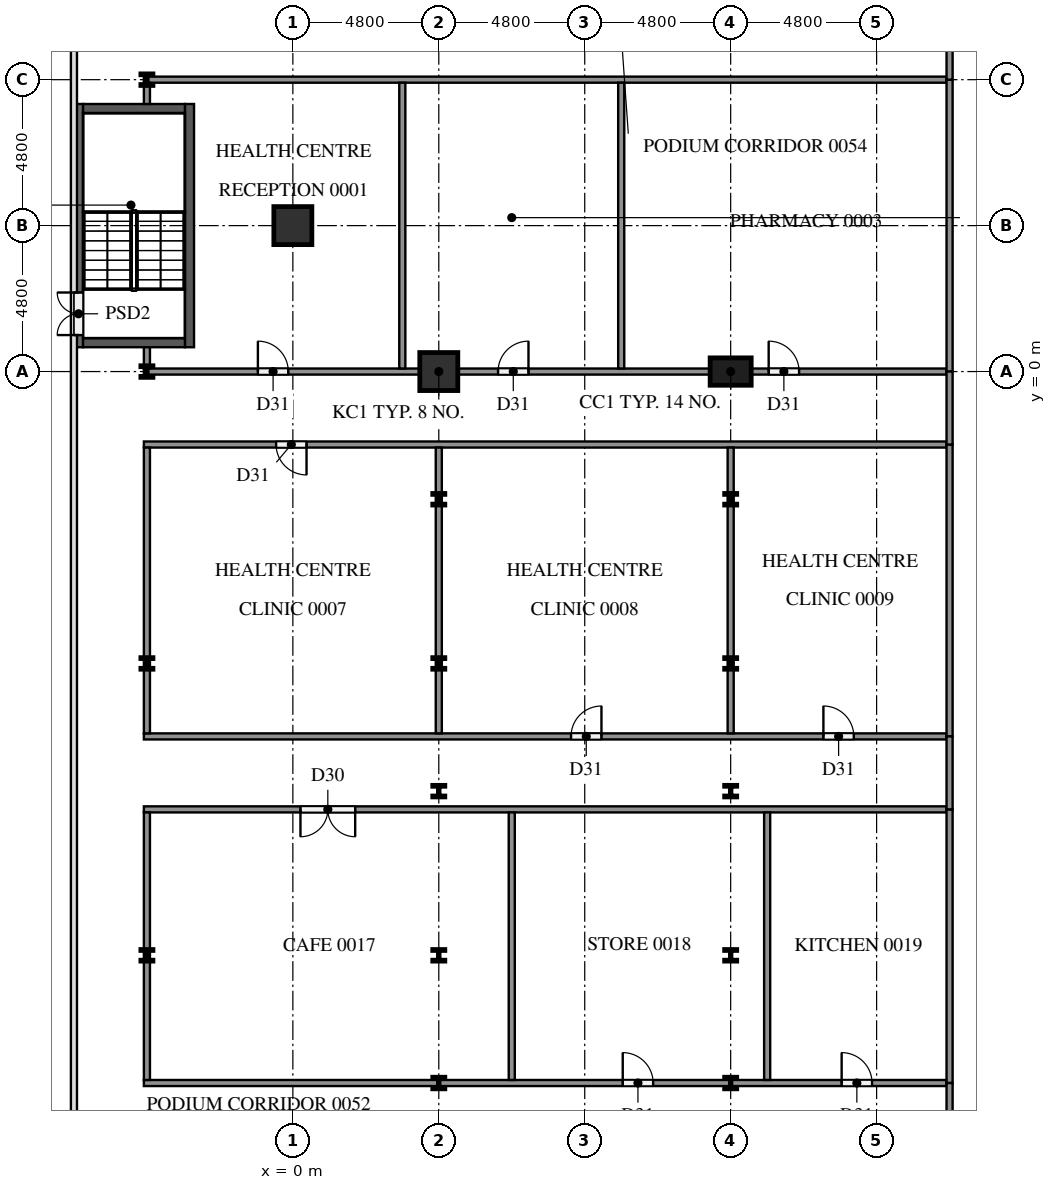
"""IFC4 building model, lengths in metres.
Left out: names, types, materials, properties, quantities, classifications, styles, units other than length and angle.
Written with IfcOpenShell. Run it as: python <this file> out.ifc"""

import sys

from ifc_helpers import new_model, si_unit, direction, frame, frame_2d, origin, origin_2d, place, context, subcontext, project, spatial, rectangle, i_section, extrude, element, fill, save


model = new_model("IFC4")
c1 = context("Model", 3, precision=1e-05, world=origin(), true_north=direction((0.0, 1.0)))
c2 = subcontext(c1, "Body", "Model", "MODEL_VIEW")
j1 = project(units=[si_unit("LENGTHUNIT", "METRE"), si_unit("PLANEANGLEUNIT", "RADIAN")], contexts=[c1])
p1 = place(None, origin())
s1 = spatial("IfcSite", under=j1, at=p1, CompositionType="ELEMENT")
p2 = place(p1, origin())
s2 = spatial("IfcBuilding", under=s1, at=p2, CompositionType="ELEMENT")
p3 = place(p2, origin())
s3 = spatial("IfcBuildingStorey", under=s2, at=p3, CompositionType="ELEMENT", Elevation=0.0)
p4 = place(p3, frame((-7.05, 0.8, 0.0), z_axis=(0.0, 0.0, 1.0), x_axis=(0.0, 1.0, 0.0)))
e1 = element("IfcWall", 1, at=p4, inside=s3, PredefinedType="SOLIDWALL", context=c2, shape_type="SweptSolid", body=[
    extrude(rectangle(XDim=8.0, YDim=0.3, at=frame_2d((4.0, 0.0))), origin(), (0.0, 0.0, 1.0), 5.7),
])
p5 = place(p4, frame((0.4, 0.0, 0.0)))
e2 = element("IfcOpeningElement", 2, at=p5, cuts=e1, PredefinedType="OPENING", context=c2, shape_type="SweptSolid", body=[
    extrude(rectangle(XDim=1.4, YDim=2.1, at=frame_2d((0.7, 1.05))), frame((0.0, 0.16, 0.0), z_axis=(0.0, -1.0, 0.0), x_axis=(1.0, 0.0, 0.0)), (0.0, 0.0, 1.0), 0.32),
])
p6 = place(p3, frame((-3.4, 0.8, 0.0), z_axis=(0.0, 0.0, 1.0), x_axis=(0.0, 1.0, 0.0)))
e3 = element("IfcWall", 3, at=p6, inside=s3, PredefinedType="SOLIDWALL", context=c2, shape_type="SweptSolid", body=[
    extrude(rectangle(XDim=8.0, YDim=0.3, at=frame_2d((4.0, 0.0))), origin(), (0.0, 0.0, 1.0), 5.7),
])
for number, where, z_axis, x_axis in (
    (4, (-6.9, 0.95, 0.0), (0.0, 0.0, 1.0), (1.0, 0.0, 0.0)),
    (5, (-6.9, 8.65, 0.0), (0.0, 0.0, 1.0), (1.0, 0.0, 0.0)),
):
    element("IfcWall", number, at=place(p3, frame(where, z_axis=z_axis, x_axis=x_axis)), inside=s3, PredefinedType="SOLIDWALL", context=c2, shape_type="SweptSolid", body=[
        extrude(rectangle(XDim=3.35, YDim=0.3, at=frame_2d((1.675, 0.0))), origin(), (0.0, 0.0, 1.0), 5.7),
    ])
p7 = place(p3, frame((4.8, 0.0, 0.0), z_axis=(0.0, 0.0, 1.0), x_axis=(1.0, 0.0, 0.0)))
e6 = element("IfcColumn", 6, at=p7, inside=s3, PredefinedType="COLUMN", context=c2, shape_type="SweptSolid", body=[
    extrude(rectangle(XDim=1.25, YDim=1.25, at=origin_2d()), origin(), (0.0, 0.0, 1.0), 5.7),
])
p8 = place(p3, frame((14.4, 0.0, 0.0), z_axis=(0.0, 0.0, 1.0), x_axis=(1.0, 0.0, 0.0)))
e7 = element("IfcColumn", 7, at=p8, inside=s3, PredefinedType="COLUMN", context=c2, shape_type="SweptSolid", body=[
    extrude(rectangle(XDim=1.35, YDim=0.9, at=origin_2d()), origin(), (0.0, 0.0, 1.0), 5.7),
])
p9 = place(p3, frame((0.0, 4.8, 0.0), z_axis=(0.0, 0.0, 1.0), x_axis=(1.0, 0.0, 0.0)))
e8 = element("IfcColumn", 8, at=p9, inside=s3, PredefinedType="COLUMN", context=c2, shape_type="SweptSolid", body=[
    extrude(rectangle(XDim=1.25, YDim=1.25, at=origin_2d()), origin(), (0.0, 0.0, 1.0), 5.7),
])
for number, where, z_axis, x_axis in (
    (9, (-4.8, -19.2, 0.0), (0.0, 0.0, 1.0), (1.0, 0.0, 0.0)),
    (10, (-4.8, -9.6, 0.0), (0.0, 0.0, 1.0), (1.0, 0.0, 0.0)),
    (11, (-4.8, 0.0, 0.0), (0.0, 0.0, 1.0), (1.0, 0.0, 0.0)),
    (12, (-4.8, 9.6, 0.0), (0.0, 0.0, 1.0), (1.0, 0.0, 0.0)),
    (13, (4.8, -23.4, 0.0), (0.0, 0.0, 1.0), (1.0, 0.0, 0.0)),
    (14, (4.8, -19.2, 0.0), (0.0, 0.0, 1.0), (1.0, 0.0, 0.0)),
    (15, (4.8, -13.8, 0.0), (0.0, 0.0, 1.0), (1.0, 0.0, 0.0)),
    (16, (4.8, -9.6, 0.0), (0.0, 0.0, 1.0), (1.0, 0.0, 0.0)),
    (17, (4.8, -4.2, 0.0), (0.0, 0.0, 1.0), (1.0, 0.0, 0.0)),
    (18, (14.4, -23.4, 0.0), (0.0, 0.0, 1.0), (1.0, 0.0, 0.0)),
    (19, (14.4, -19.2, 0.0), (0.0, 0.0, 1.0), (1.0, 0.0, 0.0)),
    (20, (14.4, -13.8, 0.0), (0.0, 0.0, 1.0), (1.0, 0.0, 0.0)),
    (21, (14.4, -9.6, 0.0), (0.0, 0.0, 1.0), (1.0, 0.0, 0.0)),
    (22, (14.4, -4.2, 0.0), (0.0, 0.0, 1.0), (1.0, 0.0, 0.0)),
):
    element("IfcColumn", number, at=place(p3, frame(where, z_axis=z_axis, x_axis=x_axis)), inside=s3, PredefinedType="COLUMN", context=c2, shape_type="SweptSolid", body=[
        extrude(i_section(OverallWidth=0.396, OverallDepth=0.381, WebThickness=0.019, FlangeThickness=0.03, at=origin_2d()), origin(), (0.0, 0.0, 1.0), 5.7),
    ])
p10 = place(p3, frame((-4.9, -23.4, 0.0), z_axis=(0.0, 0.0, 1.0), x_axis=(1.0, 0.0, 0.0)))
e23 = element("IfcWall", 23, at=p10, inside=s3, PredefinedType="PARTITIONING", context=c2, shape_type="SweptSolid", body=[
    extrude(rectangle(XDim=26.4, YDim=0.2, at=frame_2d((13.2, 0.0))), origin(), (0.0, 0.0, 1.0), 5.7),
])
p11 = place(p10, frame((15.75, 0.0, 0.0)))
e24 = element("IfcOpeningElement", 24, at=p11, cuts=e23, PredefinedType="OPENING", context=c2, shape_type="SweptSolid", body=[
    extrude(rectangle(XDim=1.0, YDim=2.1, at=frame_2d((0.5, 1.05))), frame((0.0, 0.11, 0.0), z_axis=(0.0, -1.0, 0.0), x_axis=(1.0, 0.0, 0.0)), (0.0, 0.0, 1.0), 0.22),
])
p12 = place(p10, frame((22.95, 0.0, 0.0)))
e25 = element("IfcOpeningElement", 25, at=p12, cuts=e23, PredefinedType="OPENING", context=c2, shape_type="SweptSolid", body=[
    extrude(rectangle(XDim=1.0, YDim=2.1, at=frame_2d((0.5, 1.05))), frame((0.0, 0.11, 0.0), z_axis=(0.0, -1.0, 0.0), x_axis=(1.0, 0.0, 0.0)), (0.0, 0.0, 1.0), 0.22),
])
p13 = place(p3, frame((21.5, -14.4, 0.0), z_axis=(0.0, 0.0, 1.0), x_axis=(-1.0, 0.0, 0.0)))
e26 = element("IfcWall", 26, at=p13, inside=s3, PredefinedType="PARTITIONING", context=c2, shape_type="SweptSolid", body=[
    extrude(rectangle(XDim=26.4, YDim=0.2, at=frame_2d((13.2, 0.0))), origin(), (0.0, 0.0, 1.0), 5.7),
])
p14 = place(p13, frame((19.45, 0.0, 0.0)))
e27 = element("IfcOpeningElement", 27, at=p14, cuts=e26, PredefinedType="OPENING", context=c2, shape_type="SweptSolid", body=[
    extrude(rectangle(XDim=1.8, YDim=2.1, at=frame_2d((0.9, 1.05))), frame((0.0, 0.11, 0.0), z_axis=(0.0, -1.0, 0.0), x_axis=(1.0, 0.0, 0.0)), (0.0, 0.0, 1.0), 0.22),
])
p15 = place(p3, frame((-4.9, -12.0, 0.0), z_axis=(0.0, 0.0, 1.0), x_axis=(1.0, 0.0, 0.0)))
e28 = element("IfcWall", 28, at=p15, inside=s3, PredefinedType="PARTITIONING", context=c2, shape_type="SweptSolid", body=[
    extrude(rectangle(XDim=26.4, YDim=0.2, at=frame_2d((13.2, 0.0))), origin(), (0.0, 0.0, 1.0), 5.7),
])
p16 = place(p15, frame((14.05, 0.0, 0.0)))
e29 = element("IfcOpeningElement", 29, at=p16, cuts=e28, PredefinedType="OPENING", context=c2, shape_type="SweptSolid", body=[
    extrude(rectangle(XDim=1.0, YDim=2.1, at=frame_2d((0.5, 1.05))), frame((0.0, 0.11, 0.0), z_axis=(0.0, -1.0, 0.0), x_axis=(1.0, 0.0, 0.0)), (0.0, 0.0, 1.0), 0.22),
])
p17 = place(p15, frame((22.35, 0.0, 0.0)))
e30 = element("IfcOpeningElement", 30, at=p17, cuts=e28, PredefinedType="OPENING", context=c2, shape_type="SweptSolid", body=[
    extrude(rectangle(XDim=1.0, YDim=2.1, at=frame_2d((0.5, 1.05))), frame((0.0, 0.11, 0.0), z_axis=(0.0, -1.0, 0.0), x_axis=(1.0, 0.0, 0.0)), (0.0, 0.0, 1.0), 0.22),
])
p18 = place(p3, frame((21.5, -2.4, 0.0), z_axis=(0.0, 0.0, 1.0), x_axis=(-1.0, 0.0, 0.0)))
e31 = element("IfcWall", 31, at=p18, inside=s3, PredefinedType="PARTITIONING", context=c2, shape_type="SweptSolid", body=[
    extrude(rectangle(XDim=26.4, YDim=0.2, at=frame_2d((13.2, 0.0))), origin(), (0.0, 0.0, 1.0), 5.7),
])
p19 = place(p18, frame((21.05, 0.0, 0.0)))
e32 = element("IfcOpeningElement", 32, at=p19, cuts=e31, PredefinedType="OPENING", context=c2, shape_type="SweptSolid", body=[
    extrude(rectangle(XDim=1.0, YDim=2.1, at=frame_2d((0.5, 1.05))), frame((0.0, 0.11, 0.0), z_axis=(0.0, -1.0, 0.0), x_axis=(1.0, 0.0, 0.0)), (0.0, 0.0, 1.0), 0.22),
])
p20 = place(p3, frame((-4.9, 0.0, 0.0), z_axis=(0.0, 0.0, 1.0), x_axis=(1.0, 0.0, 0.0)))
e33 = element("IfcWall", 33, at=p20, inside=s3, PredefinedType="PARTITIONING", context=c2, shape_type="SweptSolid", body=[
    extrude(rectangle(XDim=26.4, YDim=0.2, at=frame_2d((13.2, 0.0))), origin(), (0.0, 0.0, 1.0), 5.7),
])
p21 = place(p20, frame((3.75, 0.0, 0.0)))
e34 = element("IfcOpeningElement", 34, at=p21, cuts=e33, PredefinedType="OPENING", context=c2, shape_type="SweptSolid", body=[
    extrude(rectangle(XDim=1.0, YDim=2.1, at=frame_2d((0.5, 1.05))), frame((0.0, 0.11, 0.0), z_axis=(0.0, -1.0, 0.0), x_axis=(1.0, 0.0, 0.0)), (0.0, 0.0, 1.0), 0.22),
])
p22 = place(p20, frame((11.65, 0.0, 0.0)))
e35 = element("IfcOpeningElement", 35, at=p22, cuts=e33, PredefinedType="OPENING", context=c2, shape_type="SweptSolid", body=[
    extrude(rectangle(XDim=1.0, YDim=2.1, at=frame_2d((0.5, 1.05))), frame((0.0, 0.11, 0.0), z_axis=(0.0, -1.0, 0.0), x_axis=(1.0, 0.0, 0.0)), (0.0, 0.0, 1.0), 0.22),
])
p23 = place(p20, frame((20.55, 0.0, 0.0)))
e36 = element("IfcOpeningElement", 36, at=p23, cuts=e33, PredefinedType="OPENING", context=c2, shape_type="SweptSolid", body=[
    extrude(rectangle(XDim=1.0, YDim=2.1, at=frame_2d((0.5, 1.05))), frame((0.0, 0.11, 0.0), z_axis=(0.0, -1.0, 0.0), x_axis=(1.0, 0.0, 0.0)), (0.0, 0.0, 1.0), 0.22),
])
p24 = place(p3, frame((-4.9, 9.6, 0.0), z_axis=(0.0, 0.0, 1.0), x_axis=(1.0, 0.0, 0.0)))
e37 = element("IfcWall", 37, at=p24, inside=s3, PredefinedType="PARTITIONING", context=c2, shape_type="SweptSolid", body=[
    extrude(rectangle(XDim=26.4, YDim=0.2, at=frame_2d((13.2, 0.0))), origin(), (0.0, 0.0, 1.0), 5.7),
])
p25 = place(p3, frame((-4.8, -23.3, 0.0), z_axis=(0.0, 0.0, 1.0), x_axis=(0.0, 1.0, 0.0)))
e38 = element("IfcWall", 38, at=p25, inside=s3, PredefinedType="PARTITIONING", context=c2, shape_type="SweptSolid", body=[
    extrude(rectangle(XDim=8.8, YDim=0.2, at=frame_2d((4.4, 0.0))), origin(), (0.0, 0.0, 1.0), 5.7),
])
p26 = place(p3, frame((-4.8, -11.9, 0.0), z_axis=(0.0, 0.0, 1.0), x_axis=(0.0, 1.0, 0.0)))
e39 = element("IfcWall", 39, at=p26, inside=s3, PredefinedType="PARTITIONING", context=c2, shape_type="SweptSolid", body=[
    extrude(rectangle(XDim=9.4, YDim=0.2, at=frame_2d((4.7, 0.0))), origin(), (0.0, 0.0, 1.0), 5.7),
])
for number, where, z_axis, x_axis in (
    (40, (-4.8, 0.1, 0.0), (0.0, 0.0, 1.0), (0.0, 1.0, 0.0)),
    (41, (-4.8, 8.8, 0.0), (0.0, 0.0, 1.0), (0.0, 1.0, 0.0)),
):
    element("IfcWall", number, at=place(p3, frame(where, z_axis=z_axis, x_axis=x_axis)), inside=s3, PredefinedType="PARTITIONING", context=c2, shape_type="SweptSolid", body=[
        extrude(rectangle(XDim=0.7, YDim=0.2, at=frame_2d((0.35, 0.0))), origin(), (0.0, 0.0, 1.0), 5.7),
    ])
for number, where, z_axis, x_axis in (
    (42, (3.6, 0.1, 0.0), (0.0, 0.0, 1.0), (0.0, 1.0, 0.0)),
    (43, (4.8, -11.9, 0.0), (0.0, 0.0, 1.0), (0.0, 1.0, 0.0)),
):
    element("IfcWall", number, at=place(p3, frame(where, z_axis=z_axis, x_axis=x_axis)), inside=s3, PredefinedType="PARTITIONING", context=c2, shape_type="SweptSolid", body=[
        extrude(rectangle(XDim=9.4, YDim=0.2, at=frame_2d((4.7, 0.0))), origin(), (0.0, 0.0, 1.0), 5.7),
    ])
p27 = place(p3, frame((7.2, -23.3, 0.0), z_axis=(0.0, 0.0, 1.0), x_axis=(0.0, 1.0, 0.0)))
e44 = element("IfcWall", 44, at=p27, inside=s3, PredefinedType="PARTITIONING", context=c2, shape_type="SweptSolid", body=[
    extrude(rectangle(XDim=8.8, YDim=0.2, at=frame_2d((4.4, 0.0))), origin(), (0.0, 0.0, 1.0), 5.7),
])
for number, where, z_axis, x_axis in (
    (45, (10.8, 0.1, 0.0), (0.0, 0.0, 1.0), (0.0, 1.0, 0.0)),
    (46, (14.4, -11.9, 0.0), (0.0, 0.0, 1.0), (0.0, 1.0, 0.0)),
):
    element("IfcWall", number, at=place(p3, frame(where, z_axis=z_axis, x_axis=x_axis)), inside=s3, PredefinedType="PARTITIONING", context=c2, shape_type="SweptSolid", body=[
        extrude(rectangle(XDim=9.4, YDim=0.2, at=frame_2d((4.7, 0.0))), origin(), (0.0, 0.0, 1.0), 5.7),
    ])
p28 = place(p3, frame((15.6, -23.3, 0.0), z_axis=(0.0, 0.0, 1.0), x_axis=(0.0, 1.0, 0.0)))
e47 = element("IfcWall", 47, at=p28, inside=s3, PredefinedType="PARTITIONING", context=c2, shape_type="SweptSolid", body=[
    extrude(rectangle(XDim=8.8, YDim=0.2, at=frame_2d((4.4, 0.0))), origin(), (0.0, 0.0, 1.0), 5.7),
])
p29 = place(p3, frame((21.6, -23.4, 0.0), z_axis=(0.0, 0.0, 1.0), x_axis=(0.0, 1.0, 0.0)))
e48 = element("IfcWall", 48, at=p29, inside=s3, PredefinedType="PARTITIONING", context=c2, shape_type="SweptSolid", body=[
    extrude(rectangle(XDim=9.0, YDim=0.2, at=frame_2d((4.5, 0.0))), origin(), (0.0, 0.0, 1.0), 5.7),
])
for number, where, z_axis, x_axis in (
    (49, (21.6, -12.0, 0.0), (0.0, 0.0, 1.0), (0.0, 1.0, 0.0)),
    (50, (21.6, 0.0, 0.0), (0.0, 0.0, 1.0), (0.0, 1.0, 0.0)),
):
    element("IfcWall", number, at=place(p3, frame(where, z_axis=z_axis, x_axis=x_axis)), inside=s3, PredefinedType="PARTITIONING", context=c2, shape_type="SweptSolid", body=[
        extrude(rectangle(XDim=9.6, YDim=0.2, at=frame_2d((4.8, 0.0))), origin(), (0.0, 0.0, 1.0), 5.7),
    ])
p30 = place(p3, frame((21.6, -26.4, 0.0), z_axis=(0.0, 0.0, 1.0), x_axis=(0.0, 1.0, 0.0)))
e51 = element("IfcWall", 51, at=p30, inside=s3, PredefinedType="PARTITIONING", context=c2, shape_type="SweptSolid", body=[
    extrude(rectangle(XDim=3.0, YDim=0.2, at=frame_2d((1.5, 0.0))), origin(), (0.0, 0.0, 1.0), 5.7),
])
for number, where, z_axis, x_axis in (
    (52, (21.6, -14.4, 0.0), (0.0, 0.0, 1.0), (0.0, 1.0, 0.0)),
    (53, (21.6, -2.4, 0.0), (0.0, 0.0, 1.0), (0.0, 1.0, 0.0)),
):
    element("IfcWall", number, at=place(p3, frame(where, z_axis=z_axis, x_axis=x_axis)), inside=s3, PredefinedType="PARTITIONING", context=c2, shape_type="SweptSolid", body=[
        extrude(rectangle(XDim=2.4, YDim=0.2, at=frame_2d((1.2, 0.0))), origin(), (0.0, 0.0, 1.0), 5.7),
    ])
p31 = place(p3, frame((21.6, 9.6, 0.0), z_axis=(0.0, 0.0, 1.0), x_axis=(0.0, 1.0, 0.0)))
e54 = element("IfcWall", 54, at=p31, inside=s3, PredefinedType="PARTITIONING", context=c2, shape_type="SweptSolid", body=[
    extrude(rectangle(XDim=2.3, YDim=0.2, at=frame_2d((1.15, 0.0))), origin(), (0.0, 0.0, 1.0), 5.7),
])
p32 = place(p5, origin())
e55 = element("IfcDoor", 55, at=p32, inside=s3, OperationType="DOUBLE_DOOR_SINGLE_SWING", PredefinedType="DOOR", context=c2, shape_type="SweptSolid", body=[
    extrude(rectangle(XDim=1.4, YDim=2.1, at=frame_2d((0.7, 1.05))), frame((0.0, 0.025, 0.0), z_axis=(0.0, -1.0, 0.0), x_axis=(1.0, 0.0, 0.0)), (0.0, 0.0, 1.0), 0.05),
])
fill(e2, e55)
p33 = place(p21, origin())
e56 = element("IfcDoor", 56, at=p33, inside=s3, OperationType="SINGLE_SWING_LEFT", PredefinedType="DOOR", context=c2, shape_type="SweptSolid", body=[
    extrude(rectangle(XDim=1.0, YDim=2.1, at=frame_2d((0.5, 1.05))), frame((0.0, 0.025, 0.0), z_axis=(0.0, -1.0, 0.0), x_axis=(1.0, 0.0, 0.0)), (0.0, 0.0, 1.0), 0.05),
])
fill(e34, e56)
p34 = place(p22, origin())
e57 = element("IfcDoor", 57, at=p34, inside=s3, OperationType="SINGLE_SWING_RIGHT", PredefinedType="DOOR", context=c2, shape_type="SweptSolid", body=[
    extrude(rectangle(XDim=1.0, YDim=2.1, at=frame_2d((0.5, 1.05))), frame((0.0, 0.025, 0.0), z_axis=(0.0, -1.0, 0.0), x_axis=(1.0, 0.0, 0.0)), (0.0, 0.0, 1.0), 0.05),
])
fill(e35, e57)
p35 = place(p23, origin())
e58 = element("IfcDoor", 58, at=p35, inside=s3, OperationType="SINGLE_SWING_LEFT", PredefinedType="DOOR", context=c2, shape_type="SweptSolid", body=[
    extrude(rectangle(XDim=1.0, YDim=2.1, at=frame_2d((0.5, 1.05))), frame((0.0, 0.025, 0.0), z_axis=(0.0, -1.0, 0.0), x_axis=(1.0, 0.0, 0.0)), (0.0, 0.0, 1.0), 0.05),
])
fill(e36, e58)
p36 = place(p19, origin())
e59 = element("IfcDoor", 59, at=p36, inside=s3, OperationType="SINGLE_SWING_LEFT", PredefinedType="DOOR", context=c2, shape_type="SweptSolid", body=[
    extrude(rectangle(XDim=1.0, YDim=2.1, at=frame_2d((0.5, 1.05))), frame((0.0, 0.025, 0.0), z_axis=(0.0, -1.0, 0.0), x_axis=(1.0, 0.0, 0.0)), (0.0, 0.0, 1.0), 0.05),
])
fill(e32, e59)
p37 = place(p16, origin())
e60 = element("IfcDoor", 60, at=p37, inside=s3, OperationType="SINGLE_SWING_RIGHT", PredefinedType="DOOR", context=c2, shape_type="SweptSolid", body=[
    extrude(rectangle(XDim=1.0, YDim=2.1, at=frame_2d((0.5, 1.05))), frame((0.0, 0.025, 0.0), z_axis=(0.0, -1.0, 0.0), x_axis=(1.0, 0.0, 0.0)), (0.0, 0.0, 1.0), 0.05),
])
fill(e29, e60)
p38 = place(p17, origin())
e61 = element("IfcDoor", 61, at=p38, inside=s3, OperationType="SINGLE_SWING_LEFT", PredefinedType="DOOR", context=c2, shape_type="SweptSolid", body=[
    extrude(rectangle(XDim=1.0, YDim=2.1, at=frame_2d((0.5, 1.05))), frame((0.0, 0.025, 0.0), z_axis=(0.0, -1.0, 0.0), x_axis=(1.0, 0.0, 0.0)), (0.0, 0.0, 1.0), 0.05),
])
fill(e30, e61)
p39 = place(p14, origin())
e62 = element("IfcDoor", 62, at=p39, inside=s3, OperationType="DOUBLE_DOOR_SINGLE_SWING", PredefinedType="DOOR", context=c2, shape_type="SweptSolid", body=[
    extrude(rectangle(XDim=1.8, YDim=2.1, at=frame_2d((0.9, 1.05))), frame((0.0, 0.025, 0.0), z_axis=(0.0, -1.0, 0.0), x_axis=(1.0, 0.0, 0.0)), (0.0, 0.0, 1.0), 0.05),
])
fill(e27, e62)
p40 = place(p11, origin())
e63 = element("IfcDoor", 63, at=p40, inside=s3, OperationType="SINGLE_SWING_LEFT", PredefinedType="DOOR", context=c2, shape_type="SweptSolid", body=[
    extrude(rectangle(XDim=1.0, YDim=2.1, at=frame_2d((0.5, 1.05))), frame((0.0, 0.025, 0.0), z_axis=(0.0, -1.0, 0.0), x_axis=(1.0, 0.0, 0.0)), (0.0, 0.0, 1.0), 0.05),
])
fill(e24, e63)
p41 = place(p12, origin())
e64 = element("IfcDoor", 64, at=p41, inside=s3, OperationType="SINGLE_SWING_LEFT", PredefinedType="DOOR", context=c2, shape_type="SweptSolid", body=[
    extrude(rectangle(XDim=1.0, YDim=2.1, at=frame_2d((0.5, 1.05))), frame((0.0, 0.025, 0.0), z_axis=(0.0, -1.0, 0.0), x_axis=(1.0, 0.0, 0.0)), (0.0, 0.0, 1.0), 0.05),
])
fill(e25, e64)
save(model, sys.argv[1])
